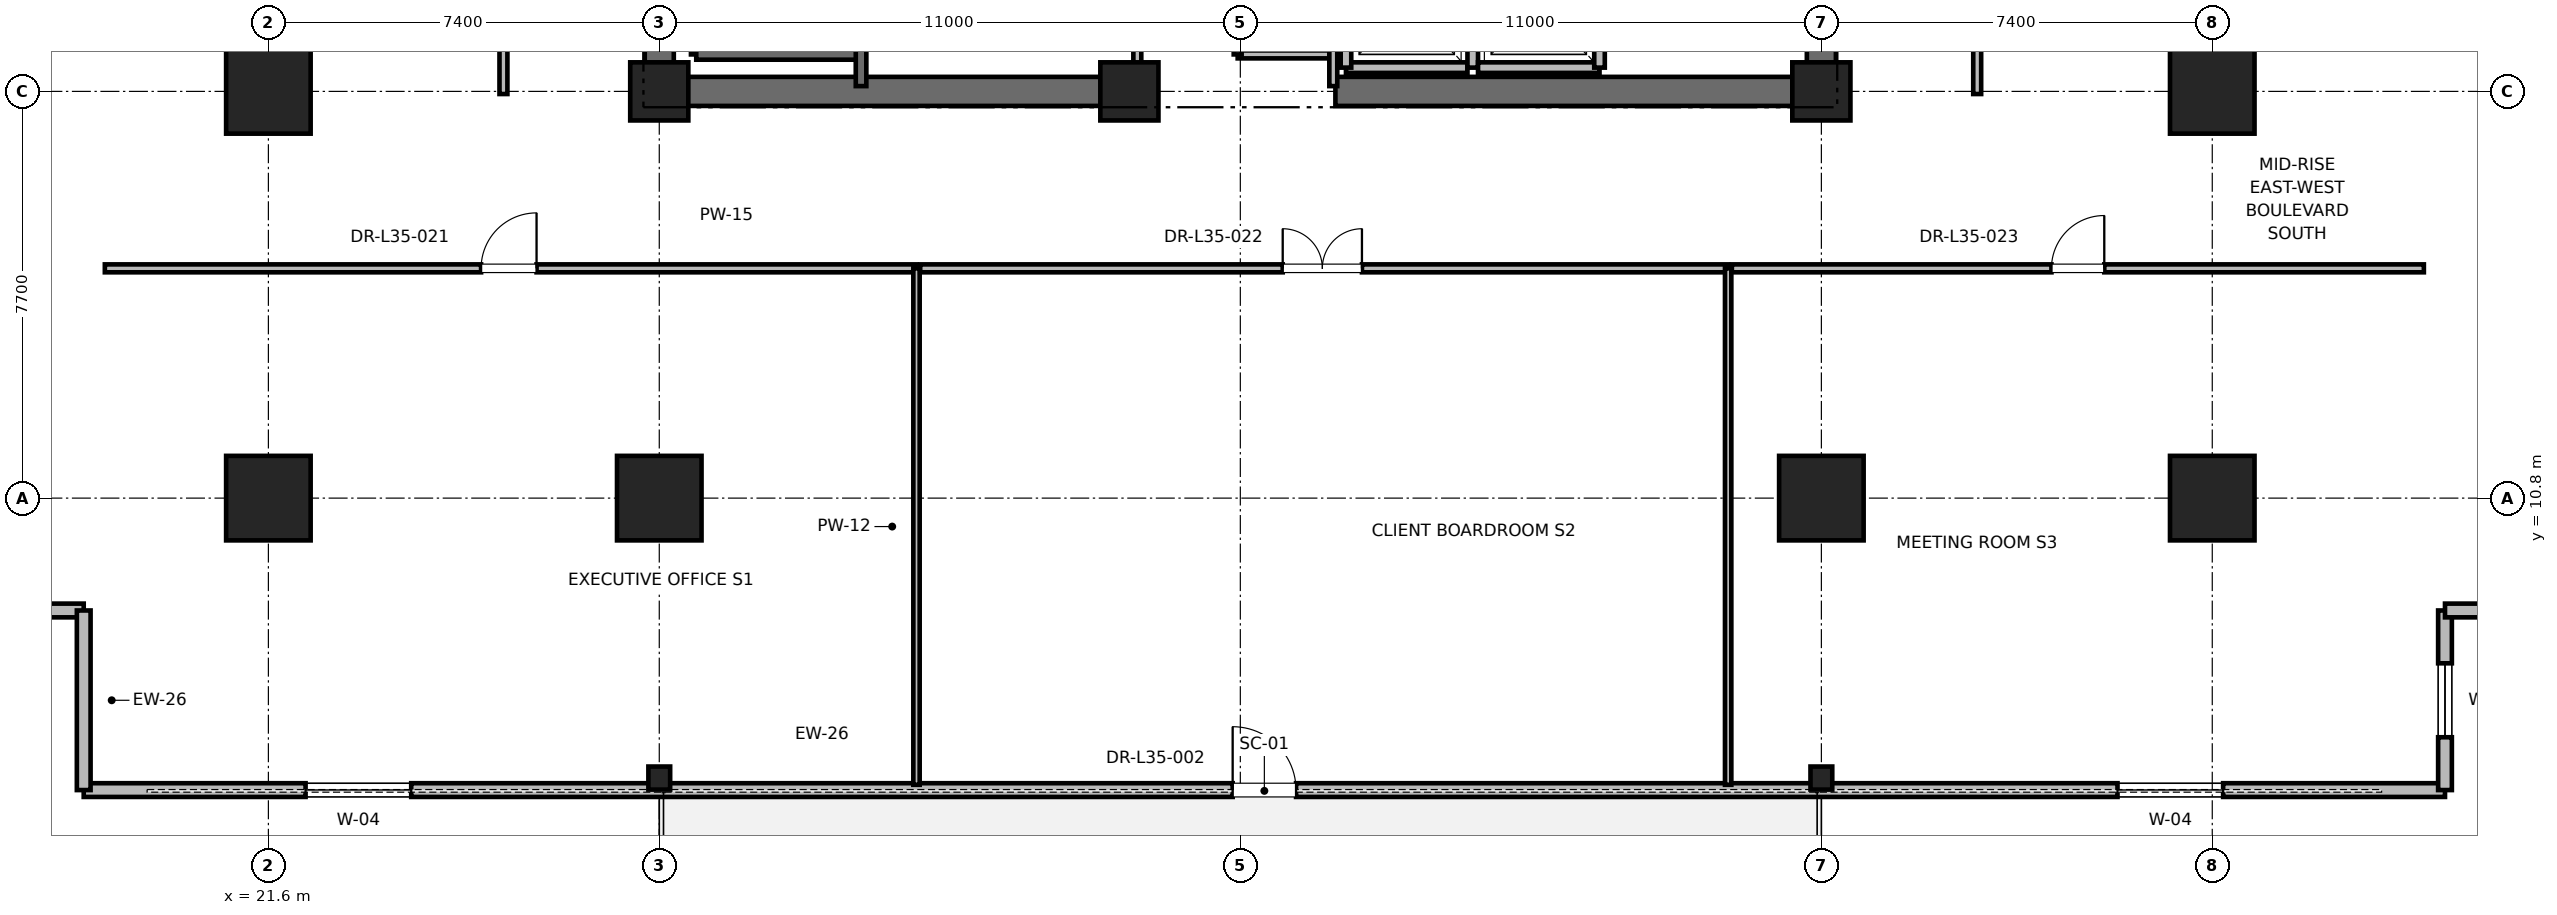
"""IFC4 building model, lengths in metres.
Left out: names, types, materials, properties, quantities, classifications, styles, units other than length and angle.
Written with IfcOpenShell. Run it as: python <this file> out.ifc"""

import sys

from ifc_helpers import new_model, si_unit, direction, frame, frame_2d, origin, origin_2d, place, context, subcontext, project, spatial, rectangle, i_section, extrude, element, fill, save


model = new_model("IFC4")
c1 = context("Model", 3, precision=1e-05, world=origin(), true_north=direction((0.0, 1.0)))
c2 = subcontext(c1, "Body", "Model", "MODEL_VIEW")
j1 = project(units=[si_unit("LENGTHUNIT", "METRE"), si_unit("PLANEANGLEUNIT", "RADIAN")], contexts=[c1])
p1 = place(None, origin())
s1 = spatial("IfcSite", under=j1, at=p1, CompositionType="ELEMENT")
p2 = place(p1, origin())
s2 = spatial("IfcBuilding", under=s1, at=p2, CompositionType="ELEMENT")
p3 = place(p2, frame((0.0, 0.0, 152.4)))
s3 = spatial("IfcBuildingStorey", under=s2, at=p3, CompositionType="ELEMENT", Elevation=152.4)
for number, where, z_axis, x_axis in (
    (1, (29.0, 10.8, 0.0), (0.0, 0.0, 1.0), (1.0, 0.0, 0.0)),
    (2, (51.0, 10.8, 0.0), (0.0, 0.0, 1.0), (1.0, 0.0, 0.0)),
    (3, (21.6, 18.5, 0.0), (0.0, 0.0, 1.0), (1.0, 0.0, 0.0)),
    (4, (58.4, 18.5, 0.0), (0.0, 0.0, 1.0), (1.0, 0.0, 0.0)),
    (5, (21.6, 10.8, 0.0), (0.0, 0.0, 1.0), (1.0, 0.0, 0.0)),
    (6, (58.4, 10.8, 0.0), (0.0, 0.0, 1.0), (1.0, 0.0, 0.0)),
):
    element("IfcColumn", number, at=place(p3, frame(where, z_axis=z_axis, x_axis=x_axis)), inside=s3, PredefinedType="COLUMN", context=c2, shape_type="SweptSolid", body=[
        extrude(rectangle(XDim=1.6, YDim=1.6, at=origin_2d()), origin(), (0.0, 0.0, 1.0), 4.0),
    ])
for number, where, z_axis, x_axis in (
    (7, (29.0, 5.5, 0.0), (0.0, 0.0, 1.0), (1.0, 0.0, 0.0)),
    (8, (51.0, 5.5, 0.0), (0.0, 0.0, 1.0), (1.0, 0.0, 0.0)),
):
    element("IfcColumn", number, at=place(p3, frame(where, z_axis=z_axis, x_axis=x_axis)), inside=s3, PredefinedType="COLUMN", context=c2, shape_type="SweptSolid", body=[
        extrude(i_section(OverallWidth=0.412, OverallDepth=0.437, WebThickness=0.036, FlangeThickness=0.058, FilletRadius=0.015, at=origin_2d()), origin(), (0.0, 0.0, 1.0), 4.0),
    ])
for number, where, z_axis, x_axis in (
    (9, (29.0, 18.5, 0.0), (0.0, 0.0, 1.0), (1.0, 0.0, 0.0)),
    (10, (51.0, 18.5, 0.0), (0.0, 0.0, 1.0), (1.0, 0.0, 0.0)),
    (11, (37.9, 18.5, 0.0), (0.0, 0.0, 1.0), (1.0, 0.0, 0.0)),
):
    element("IfcColumn", number, at=place(p3, frame(where, z_axis=z_axis, x_axis=x_axis)), inside=s3, PredefinedType="PILASTER", context=c2, shape_type="SweptSolid", body=[
        extrude(rectangle(XDim=1.1, YDim=1.1, at=origin_2d()), origin(), (0.0, 0.0, 1.0), 4.0),
    ])
for number, where, z_axis, x_axis in (
    (12, (29.0, 18.5, 0.0), (0.0, 0.0, 1.0), (1.0, 0.0, 0.0)),
    (13, (41.8, 18.5, 0.0), (0.0, 0.0, 1.0), (1.0, 0.0, 0.0)),
):
    element("IfcWall", number, at=place(p3, frame(where, z_axis=z_axis, x_axis=x_axis)), inside=s3, PredefinedType="SHEAR", context=c2, shape_type="SweptSolid", body=[
        extrude(rectangle(XDim=9.2, YDim=0.55, at=frame_2d((4.6, 0.0))), origin(), (0.0, 0.0, 1.0), 3.775),
    ])
p4 = place(p3, frame((29.0, 18.5, 0.0), z_axis=(0.0, 0.0, 1.0), x_axis=(0.0, 1.0, 0.0)))
e14 = element("IfcWall", 14, at=p4, inside=s3, PredefinedType="SHEAR", context=c2, shape_type="SweptSolid", body=[
    extrude(rectangle(XDim=8.8, YDim=0.55, at=frame_2d((4.4, 0.0))), origin(), (0.0, 0.0, 1.0), 3.775),
])
p5 = place(p3, frame((51.0, 18.5, 0.0), z_axis=(0.0, 0.0, 1.0), x_axis=(0.0, 1.0, 0.0)))
e15 = element("IfcWall", 15, at=p5, inside=s3, PredefinedType="SHEAR", context=c2, shape_type="SweptSolid", body=[
    extrude(rectangle(XDim=5.8, YDim=0.55, at=frame_2d((2.9, 0.0))), origin(), (0.0, 0.0, 1.0), 3.775),
])
p6 = place(p3, frame((18.104, 5.273, 0.0), z_axis=(0.0, 0.0, 1.0), x_axis=(1.0, 0.0, 0.0)))
e16 = element("IfcWall", 16, at=p6, inside=s3, PredefinedType="PARAPET", context=c2, shape_type="SweptSolid", body=[
    extrude(rectangle(XDim=44.702, YDim=0.26, at=frame_2d((22.351, 0.0))), origin(), (0.0, 0.0, 1.0), 2.97),
])
p7 = place(p6, frame((4.2, 0.0, 0.85)))
e17 = element("IfcOpeningElement", 17, at=p7, cuts=e16, PredefinedType="OPENING", context=c2, shape_type="SweptSolid", body=[
    extrude(rectangle(XDim=2.0, YDim=2.3, at=frame_2d((1.0, 1.15))), frame((0.0, 0.13, 0.0), z_axis=(0.0, -1.0, 0.0), x_axis=(1.0, 0.0, 0.0)), (0.0, 0.0, 1.0), 0.26),
])
p8 = place(p6, frame((21.751, 0.0, 0.0)))
e18 = element("IfcOpeningElement", 18, at=p8, cuts=e16, PredefinedType="OPENING", context=c2, shape_type="SweptSolid", body=[
    extrude(rectangle(XDim=1.2, YDim=2.2, at=frame_2d((0.6, 1.1))), frame((0.0, 0.13, 0.0), z_axis=(0.0, -1.0, 0.0), x_axis=(1.0, 0.0, 0.0)), (0.0, 0.0, 1.0), 0.26),
])
p9 = place(p6, frame((38.502, 0.0, 0.85)))
e19 = element("IfcOpeningElement", 19, at=p9, cuts=e16, PredefinedType="OPENING", context=c2, shape_type="SweptSolid", body=[
    extrude(rectangle(XDim=2.0, YDim=2.3, at=frame_2d((1.0, 1.15))), frame((0.0, 0.13, 0.0), z_axis=(0.0, -1.0, 0.0), x_axis=(1.0, 0.0, 0.0)), (0.0, 0.0, 1.0), 0.26),
])
p10 = place(p3, frame((14.304, 8.673, 0.0), z_axis=(0.0, 0.0, 1.0), x_axis=(1.0, 0.0, 0.0)))
e20 = element("IfcWall", 20, at=p10, inside=s3, PredefinedType="PARAPET", context=c2, shape_type="SweptSolid", body=[
    extrude(rectangle(XDim=3.8, YDim=0.26, at=frame_2d((1.9, 0.0))), origin(), (0.0, 0.0, 1.0), 3.775),
])
p11 = place(p10, frame((1.2, 0.0, 0.85)))
e21 = element("IfcOpeningElement", 21, at=p11, cuts=e20, PredefinedType="OPENING", context=c2, shape_type="SweptSolid", body=[
    extrude(rectangle(XDim=1.4, YDim=2.0, at=frame_2d((0.7, 1.0))), frame((0.0, 0.13, 0.0), z_axis=(0.0, -1.0, 0.0), x_axis=(1.0, 0.0, 0.0)), (0.0, 0.0, 1.0), 0.26),
])
p12 = place(p3, frame((18.104, 8.673, 0.0), z_axis=(0.0, 0.0, 1.0), x_axis=(0.0, -1.0, 0.0)))
e22 = element("IfcWall", 22, at=p12, inside=s3, PredefinedType="PARAPET", context=c2, shape_type="SweptSolid", body=[
    extrude(rectangle(XDim=3.4, YDim=0.26, at=frame_2d((1.7, 0.0))), origin(), (0.0, 0.0, 1.0), 3.775),
])
p13 = place(p3, frame((62.806, 5.273, 0.0), z_axis=(0.0, 0.0, 1.0), x_axis=(0.0, 1.0, 0.0)))
e23 = element("IfcWall", 23, at=p13, inside=s3, PredefinedType="PARAPET", context=c2, shape_type="SweptSolid", body=[
    extrude(rectangle(XDim=3.4, YDim=0.26, at=frame_2d((1.7, 0.0))), origin(), (0.0, 0.0, 1.0), 3.775),
])
p14 = place(p13, frame((1.0, 0.0, 0.85)))
e24 = element("IfcOpeningElement", 24, at=p14, cuts=e23, PredefinedType="OPENING", context=c2, shape_type="SweptSolid", body=[
    extrude(rectangle(XDim=1.4, YDim=2.0, at=frame_2d((0.7, 1.0))), frame((0.0, 0.13, 0.0), z_axis=(0.0, -1.0, 0.0), x_axis=(1.0, 0.0, 0.0)), (0.0, 0.0, 1.0), 0.26),
])
p15 = place(p3, frame((62.806, 8.673, 0.0), z_axis=(0.0, 0.0, 1.0), x_axis=(1.0, 0.0, 0.0)))
e25 = element("IfcWall", 25, at=p15, inside=s3, PredefinedType="PARAPET", context=c2, shape_type="SweptSolid", body=[
    extrude(rectangle(XDim=3.8, YDim=0.26, at=frame_2d((1.9, 0.0))), origin(), (0.0, 0.0, 1.0), 3.775),
])
p16 = place(p3, frame((29.7, 19.2, 0.0), z_axis=(0.0, 0.0, 1.0), x_axis=(0.0, 1.0, 0.0)))
e26 = element("IfcWall", 26, at=p16, inside=s3, PredefinedType="SOLIDWALL", context=c2, shape_type="SweptSolid", body=[
    extrude(rectangle(XDim=8.15, YDim=0.2, at=frame_2d((4.075, 0.0))), origin(), (0.0, 0.0, 1.0), 3.775),
])
p17 = place(p3, frame((29.7, 19.2, 0.0), z_axis=(0.0, 0.0, 1.0), x_axis=(1.0, 0.0, 0.0)))
e27 = element("IfcWall", 27, at=p17, inside=s3, PredefinedType="SOLIDWALL", context=c2, shape_type="SweptSolid", body=[
    extrude(rectangle(XDim=3.12, YDim=0.2, at=frame_2d((1.56, 0.0))), origin(), (0.0, 0.0, 1.0), 3.775),
])
p18 = place(p3, frame((32.82, 18.6, 0.0), z_axis=(0.0, 0.0, 1.0), x_axis=(0.0, 1.0, 0.0)))
e28 = element("IfcWall", 28, at=p18, inside=s3, PredefinedType="SOLIDWALL", context=c2, shape_type="SweptSolid", body=[
    extrude(rectangle(XDim=8.78, YDim=0.2, at=frame_2d((4.39, 0.0))), origin(), (0.0, 0.0, 1.0), 3.775),
])
p19 = place(p3, frame((42.0, 18.95, 0.0), z_axis=(0.0, 0.0, 1.0), x_axis=(1.0, 0.0, 0.0)))
e29 = element("IfcWall", 29, at=p19, inside=s3, PredefinedType="SOLIDWALL", context=c2, shape_type="SweptSolid", body=[
    extrude(rectangle(XDim=2.3, YDim=0.2, at=frame_2d((1.15, 0.0))), origin(), (0.0, 0.0, 1.0), 2.755),
])
p20 = place(p3, frame((42.0, 21.55, 0.0), z_axis=(0.0, 0.0, 1.0), x_axis=(0.0, -1.0, 0.0)))
e30 = element("IfcWall", 30, at=p20, inside=s3, PredefinedType="SOLIDWALL", context=c2, shape_type="SweptSolid", body=[
    extrude(rectangle(XDim=2.6, YDim=0.2, at=frame_2d((1.3, 0.0))), origin(), (0.0, 0.0, 1.0), 2.755),
])
p21 = place(p3, frame((44.4, 18.95, 0.0), z_axis=(0.0, 0.0, 1.0), x_axis=(0.0, 1.0, 0.0)))
e31 = element("IfcWall", 31, at=p21, inside=s3, PredefinedType="SOLIDWALL", context=c2, shape_type="SweptSolid", body=[
    extrude(rectangle(XDim=2.6, YDim=0.2, at=frame_2d((1.3, 0.0))), origin(), (0.0, 0.0, 1.0), 3.775),
])
p22 = place(p3, frame((44.5, 18.95, 0.0), z_axis=(0.0, 0.0, 1.0), x_axis=(1.0, 0.0, 0.0)))
e32 = element("IfcWall", 32, at=p22, inside=s3, PredefinedType="SOLIDWALL", context=c2, shape_type="SweptSolid", body=[
    extrude(rectangle(XDim=2.3, YDim=0.2, at=frame_2d((1.15, 0.0))), origin(), (0.0, 0.0, 1.0), 3.775),
])
p23 = place(p3, frame((46.8, 18.95, 0.0), z_axis=(0.0, 0.0, 1.0), x_axis=(0.0, 1.0, 0.0)))
e33 = element("IfcWall", 33, at=p23, inside=s3, PredefinedType="SOLIDWALL", context=c2, shape_type="SweptSolid", body=[
    extrude(rectangle(XDim=2.6, YDim=0.2, at=frame_2d((1.3, 0.0))), origin(), (0.0, 0.0, 1.0), 3.775),
])
p24 = place(p3, frame((39.95, 19.2, 0.0), z_axis=(0.0, 0.0, 1.0), x_axis=(1.0, 0.0, 0.0)))
e34 = element("IfcWall", 34, at=p24, inside=s3, PredefinedType="PARTITIONING", context=c2, shape_type="SweptSolid", body=[
    extrude(rectangle(XDim=1.81, YDim=0.15, at=frame_2d((0.905, 0.0))), origin(), (0.0, 0.0, 1.0), 2.85),
])
p25 = place(p3, frame((41.76, 18.6, 0.0), z_axis=(0.0, 0.0, 1.0), x_axis=(0.0, 1.0, 0.0)))
e35 = element("IfcWall", 35, at=p25, inside=s3, PredefinedType="PARTITIONING", context=c2, shape_type="SweptSolid", body=[
    extrude(rectangle(XDim=3.6, YDim=0.15, at=frame_2d((1.8, 0.0))), origin(), (0.0, 0.0, 1.0), 2.755),
])
p26 = place(p3, frame((39.95, 19.2, 0.0), z_axis=(0.0, 0.0, 1.0), x_axis=(0.0, 1.0, 0.0)))
e36 = element("IfcWall", 36, at=p26, inside=s3, PredefinedType="PARTITIONING", context=c2, shape_type="SweptSolid", body=[
    extrude(rectangle(XDim=3.0, YDim=0.15, at=frame_2d((1.5, 0.0))), origin(), (0.0, 0.0, 1.0), 2.85),
])
p27 = place(p26, frame((1.05, 0.0, 0.0)))
e37 = element("IfcOpeningElement", 37, at=p27, cuts=e36, PredefinedType="OPENING", context=c2, shape_type="SweptSolid", body=[
    extrude(rectangle(XDim=0.9, YDim=2.1, at=frame_2d((0.45, 1.05))), frame((0.0, 0.075, 0.0), z_axis=(0.0, -1.0, 0.0), x_axis=(1.0, 0.0, 0.0)), (0.0, 0.0, 1.0), 0.15),
])
p28 = place(p3, frame((38.05, 18.6, 0.0), z_axis=(0.0, 0.0, 1.0), x_axis=(0.0, 1.0, 0.0)))
e38 = element("IfcWall", 38, at=p28, inside=s3, PredefinedType="PARTITIONING", context=c2, shape_type="SweptSolid", body=[
    extrude(rectangle(XDim=8.78, YDim=0.15, at=frame_2d((4.39, 0.0))), origin(), (0.0, 0.0, 1.0), 2.755),
])
p29 = place(p28, frame((3.89, 0.0, 0.0)))
e39 = element("IfcOpeningElement", 39, at=p29, cuts=e38, PredefinedType="OPENING", context=c2, shape_type="SweptSolid", body=[
    extrude(rectangle(XDim=1.0, YDim=2.15, at=frame_2d((0.5, 1.075))), frame((0.0, 0.075, 0.0), z_axis=(0.0, -1.0, 0.0), x_axis=(1.0, 0.0, 0.0)), (0.0, 0.0, 1.0), 0.15),
])
p30 = place(p3, frame((18.504, 15.15, 0.0), z_axis=(0.0, 0.0, 1.0), x_axis=(1.0, 0.0, 0.0)))
e40 = element("IfcWall", 40, at=p30, inside=s3, PredefinedType="PARTITIONING", context=c2, shape_type="SweptSolid", body=[
    extrude(rectangle(XDim=15.366, YDim=0.15, at=frame_2d((7.683, 0.0))), origin(), (0.0, 0.0, 1.0), 2.85),
])
p31 = place(p30, frame((7.123, 0.0, 0.0)))
e41 = element("IfcOpeningElement", 41, at=p31, cuts=e40, PredefinedType="OPENING", context=c2, shape_type="SweptSolid", body=[
    extrude(rectangle(XDim=1.05, YDim=2.2, at=frame_2d((0.525, 1.1))), frame((0.0, 0.075, 0.0), z_axis=(0.0, -1.0, 0.0), x_axis=(1.0, 0.0, 0.0)), (0.0, 0.0, 1.0), 0.15),
])
p32 = place(p3, frame((33.87, 5.373, 0.0), z_axis=(0.0, 0.0, 1.0), x_axis=(0.0, 1.0, 0.0)))
e42 = element("IfcWall", 42, at=p32, inside=s3, PredefinedType="PARTITIONING", context=c2, shape_type="SweptSolid", body=[
    extrude(rectangle(XDim=9.777, YDim=0.12, at=frame_2d((4.889, 0.0))), origin(), (0.0, 0.0, 1.0), 2.405),
])
p33 = place(p3, frame((33.94, 15.15, 0.0), z_axis=(0.0, 0.0, 1.0), x_axis=(1.0, 0.0, 0.0)))
e43 = element("IfcWall", 43, at=p33, inside=s3, PredefinedType="PARTITIONING", context=c2, shape_type="SweptSolid", body=[
    extrude(rectangle(XDim=15.296, YDim=0.15, at=frame_2d((7.648, 0.0))), origin(), (0.0, 0.0, 1.0), 2.85),
])
p34 = place(p33, frame((6.863, 0.0, 0.0)))
e44 = element("IfcOpeningElement", 44, at=p34, cuts=e43, PredefinedType="OPENING", context=c2, shape_type="SweptSolid", body=[
    extrude(rectangle(XDim=1.5, YDim=2.25, at=frame_2d((0.75, 1.125))), frame((0.0, 0.075, 0.0), z_axis=(0.0, -1.0, 0.0), x_axis=(1.0, 0.0, 0.0)), (0.0, 0.0, 1.0), 0.15),
])
p35 = place(p3, frame((49.235, 5.373, 0.0), z_axis=(0.0, 0.0, 1.0), x_axis=(0.0, 1.0, 0.0)))
e45 = element("IfcWall", 45, at=p35, inside=s3, PredefinedType="PARTITIONING", context=c2, shape_type="SweptSolid", body=[
    extrude(rectangle(XDim=9.777, YDim=0.12, at=frame_2d((4.889, 0.0))), origin(), (0.0, 0.0, 1.0), 2.405),
])
p36 = place(p3, frame((49.305, 15.15, 0.0), z_axis=(0.0, 0.0, 1.0), x_axis=(1.0, 0.0, 0.0)))
e46 = element("IfcWall", 46, at=p36, inside=s3, PredefinedType="PARTITIONING", context=c2, shape_type="SweptSolid", body=[
    extrude(rectangle(XDim=13.101, YDim=0.15, at=frame_2d((6.55, 0.0))), origin(), (0.0, 0.0, 1.0), 2.85),
])
p37 = place(p36, frame((6.05, 0.0, 0.0)))
e47 = element("IfcOpeningElement", 47, at=p37, cuts=e46, PredefinedType="OPENING", context=c2, shape_type="SweptSolid", body=[
    extrude(rectangle(XDim=1.0, YDim=2.15, at=frame_2d((0.5, 1.075))), frame((0.0, 0.075, 0.0), z_axis=(0.0, -1.0, 0.0), x_axis=(1.0, 0.0, 0.0)), (0.0, 0.0, 1.0), 0.15),
])
p38 = place(p3, frame((26.05, 18.45, 0.0), z_axis=(0.0, 0.0, 1.0), x_axis=(0.0, 1.0, 0.0)))
e48 = element("IfcWall", 48, at=p38, inside=s3, PredefinedType="PARTITIONING", context=c2, shape_type="SweptSolid", body=[
    extrude(rectangle(XDim=18.1, YDim=0.15, at=frame_2d((9.05, 0.0))), origin(), (0.0, 0.0, 1.0), 2.85),
])
p39 = place(p38, frame((8.55, 0.0, 0.0)))
e49 = element("IfcOpeningElement", 49, at=p39, cuts=e48, PredefinedType="OPENING", context=c2, shape_type="SweptSolid", body=[
    extrude(rectangle(XDim=1.0, YDim=2.15, at=frame_2d((0.5, 1.075))), frame((0.0, 0.075, 0.0), z_axis=(0.0, -1.0, 0.0), x_axis=(1.0, 0.0, 0.0)), (0.0, 0.0, 1.0), 0.15),
])
p40 = place(p3, frame((53.95, 18.45, 0.0), z_axis=(0.0, 0.0, 1.0), x_axis=(0.0, 1.0, 0.0)))
e50 = element("IfcWall", 50, at=p40, inside=s3, PredefinedType="PARTITIONING", context=c2, shape_type="SweptSolid", body=[
    extrude(rectangle(XDim=18.1, YDim=0.15, at=frame_2d((9.05, 0.0))), origin(), (0.0, 0.0, 1.0), 2.85),
])
p41 = place(p40, frame((8.55, 0.0, 0.0)))
e51 = element("IfcOpeningElement", 51, at=p41, cuts=e50, PredefinedType="OPENING", context=c2, shape_type="SweptSolid", body=[
    extrude(rectangle(XDim=1.0, YDim=2.15, at=frame_2d((0.5, 1.075))), frame((0.0, 0.075, 0.0), z_axis=(0.0, -1.0, 0.0), x_axis=(1.0, 0.0, 0.0)), (0.0, 0.0, 1.0), 0.15),
])
p42 = place(p7, origin())
e52 = element("IfcWindow", 52, at=p42, inside=s3, PartitioningType="SINGLE_PANEL", PredefinedType="WINDOW", context=c2, shape_type="SweptSolid", body=[
    extrude(rectangle(XDim=2.0, YDim=2.3, at=frame_2d((1.0, 1.15))), frame((0.0, 0.03, 0.0), z_axis=(0.0, -1.0, 0.0), x_axis=(1.0, 0.0, 0.0)), (0.0, 0.0, 1.0), 0.06),
])
fill(e17, e52)
p43 = place(p8, origin())
e53 = element("IfcDoor", 53, at=p43, inside=s3, OperationType="SINGLE_SWING_LEFT", PredefinedType="DOOR", context=c2, shape_type="SweptSolid", body=[
    extrude(rectangle(XDim=1.2, YDim=2.2, at=frame_2d((0.6, 1.1))), frame((0.0, 0.025, 0.0), z_axis=(0.0, -1.0, 0.0), x_axis=(1.0, 0.0, 0.0)), (0.0, 0.0, 1.0), 0.05),
])
fill(e18, e53)
p44 = place(p9, origin())
e54 = element("IfcWindow", 54, at=p44, inside=s3, PartitioningType="SINGLE_PANEL", PredefinedType="WINDOW", context=c2, shape_type="SweptSolid", body=[
    extrude(rectangle(XDim=2.0, YDim=2.3, at=frame_2d((1.0, 1.15))), frame((0.0, 0.03, 0.0), z_axis=(0.0, -1.0, 0.0), x_axis=(1.0, 0.0, 0.0)), (0.0, 0.0, 1.0), 0.06),
])
fill(e19, e54)
p45 = place(p14, origin())
e55 = element("IfcWindow", 55, at=p45, inside=s3, PartitioningType="SINGLE_PANEL", PredefinedType="WINDOW", context=c2, shape_type="SweptSolid", body=[
    extrude(rectangle(XDim=1.4, YDim=2.0, at=frame_2d((0.7, 1.0))), frame((0.0, 0.03, 0.0), z_axis=(0.0, -1.0, 0.0), x_axis=(1.0, 0.0, 0.0)), (0.0, 0.0, 1.0), 0.06),
])
fill(e24, e55)
p46 = place(p31, origin())
e56 = element("IfcDoor", 56, at=p46, inside=s3, OperationType="SINGLE_SWING_RIGHT", PredefinedType="DOOR", context=c2, shape_type="SweptSolid", body=[
    extrude(rectangle(XDim=1.05, YDim=2.2, at=frame_2d((0.525, 1.1))), frame((0.0, 0.025, 0.0), z_axis=(0.0, -1.0, 0.0), x_axis=(1.0, 0.0, 0.0)), (0.0, 0.0, 1.0), 0.05),
])
fill(e41, e56)
p47 = place(p34, origin())
e57 = element("IfcDoor", 57, at=p47, inside=s3, OperationType="DOUBLE_DOOR_SINGLE_SWING", PredefinedType="DOOR", context=c2, shape_type="SweptSolid", body=[
    extrude(rectangle(XDim=1.5, YDim=2.25, at=frame_2d((0.75, 1.125))), frame((0.0, 0.025, 0.0), z_axis=(0.0, -1.0, 0.0), x_axis=(1.0, 0.0, 0.0)), (0.0, 0.0, 1.0), 0.05),
])
fill(e44, e57)
p48 = place(p37, origin())
e58 = element("IfcDoor", 58, at=p48, inside=s3, OperationType="SINGLE_SWING_RIGHT", PredefinedType="DOOR", context=c2, shape_type="SweptSolid", body=[
    extrude(rectangle(XDim=1.0, YDim=2.15, at=frame_2d((0.5, 1.075))), frame((0.0, 0.025, 0.0), z_axis=(0.0, -1.0, 0.0), x_axis=(1.0, 0.0, 0.0)), (0.0, 0.0, 1.0), 0.05),
])
fill(e47, e58)
save(model, sys.argv[1])
